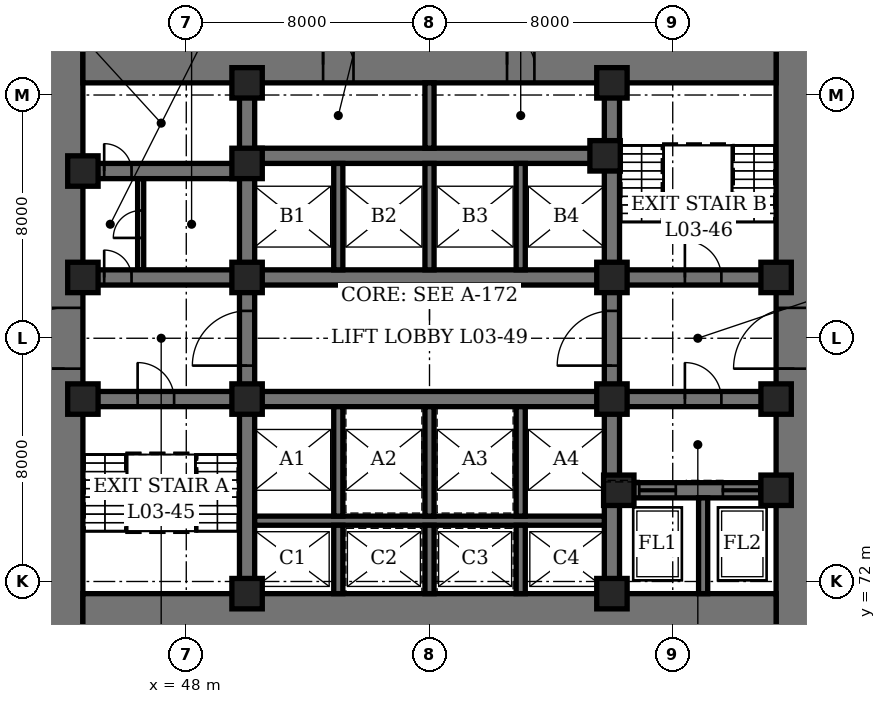
"""IFC4 building model, lengths in metres.
Left out: names, types, materials, properties, quantities, classifications, styles, units other than length and angle.
Written with IfcOpenShell. Run it as: python <this file> out.ifc"""

import sys

from ifc_helpers import new_model, si_unit, direction, frame, frame_2d, origin, origin_2d, place, context, subcontext, project, spatial, rectangle, hollow_rectangle, extrude, element, fill, save


model = new_model("IFC4")
c1 = context("Model", 3, precision=1e-05, world=origin(), true_north=direction((0.0, 1.0)))
c2 = subcontext(c1, "Body", "Model", "MODEL_VIEW")
j1 = project(units=[si_unit("LENGTHUNIT", "METRE"), si_unit("PLANEANGLEUNIT", "RADIAN")], contexts=[c1])
p1 = place(None, origin())
s1 = spatial("IfcSite", under=j1, at=p1, CompositionType="ELEMENT")
p2 = place(p1, origin())
s2 = spatial("IfcBuilding", under=s1, at=p2, CompositionType="ELEMENT")
p3 = place(p2, frame((0.0, 0.0, 14.9)))
s3 = spatial("IfcBuildingStorey", under=s2, at=p3, CompositionType="ELEMENT", Elevation=14.9)
p4 = place(p3, frame((44.0, 70.4, 0.0), z_axis=(0.0, 0.0, 1.0), x_axis=(0.0, 1.0, 0.0)))
e1 = element("IfcWall", 1, at=p4, inside=s3, PredefinedType="SHEAR", context=c2, shape_type="SweptSolid", body=[
    extrude(rectangle(XDim=19.2, YDim=1.2, at=frame_2d((9.6, 0.0))), origin(), (0.0, 0.0, 1.0), 5.0),
])
p5 = place(p4, frame((8.6, 0.0, 0.0)))
e2 = element("IfcOpeningElement", 2, at=p5, cuts=e1, PredefinedType="OPENING", context=c2, shape_type="SweptSolid", body=[
    extrude(rectangle(XDim=2.0, YDim=2.4, at=frame_2d((1.0, 1.2))), frame((0.0, 0.61, 0.0), z_axis=(0.0, -1.0, 0.0), x_axis=(1.0, 0.0, 0.0)), (0.0, 0.0, 1.0), 1.22),
])
p6 = place(p3, frame((68.0, 70.4, 0.0), z_axis=(0.0, 0.0, 1.0), x_axis=(0.0, 1.0, 0.0)))
e3 = element("IfcWall", 3, at=p6, inside=s3, PredefinedType="SHEAR", context=c2, shape_type="SweptSolid", body=[
    extrude(rectangle(XDim=19.2, YDim=1.2, at=frame_2d((9.6, 0.0))), origin(), (0.0, 0.0, 1.0), 5.0),
])
p7 = place(p6, frame((8.6, 0.0, 0.0)))
e4 = element("IfcOpeningElement", 4, at=p7, cuts=e3, PredefinedType="OPENING", context=c2, shape_type="SweptSolid", body=[
    extrude(rectangle(XDim=2.0, YDim=2.4, at=frame_2d((1.0, 1.2))), frame((0.0, 0.61, 0.0), z_axis=(0.0, -1.0, 0.0), x_axis=(1.0, 0.0, 0.0)), (0.0, 0.0, 1.0), 1.22),
])
p8 = place(p3, frame((44.6, 71.0, 0.0), z_axis=(0.0, 0.0, 1.0), x_axis=(1.0, 0.0, 0.0)))
e5 = element("IfcWall", 5, at=p8, inside=s3, PredefinedType="SHEAR", context=c2, shape_type="SweptSolid", body=[
    extrude(rectangle(XDim=22.8, YDim=1.2, at=frame_2d((11.4, 0.0))), origin(), (0.0, 0.0, 1.0), 5.0),
])
p9 = place(p3, frame((44.6, 89.0, 0.0), z_axis=(0.0, 0.0, 1.0), x_axis=(1.0, 0.0, 0.0)))
e6 = element("IfcWall", 6, at=p9, inside=s3, PredefinedType="SHEAR", context=c2, shape_type="SweptSolid", body=[
    extrude(rectangle(XDim=22.8, YDim=1.2, at=frame_2d((11.4, 0.0))), origin(), (0.0, 0.0, 1.0), 5.0),
])
p10 = place(p9, frame((7.9, 0.0, 0.0)))
e7 = element("IfcOpeningElement", 7, at=p10, cuts=e6, PredefinedType="OPENING", context=c2, shape_type="SweptSolid", body=[
    extrude(rectangle(XDim=1.0, YDim=2.1, at=frame_2d((0.5, 1.05))), frame((0.0, 0.61, 0.0), z_axis=(0.0, -1.0, 0.0), x_axis=(1.0, 0.0, 0.0)), (0.0, 0.0, 1.0), 1.22),
])
p11 = place(p9, frame((13.95, 0.0, 0.0)))
e8 = element("IfcOpeningElement", 8, at=p11, cuts=e6, PredefinedType="OPENING", context=c2, shape_type="SweptSolid", body=[
    extrude(rectangle(XDim=0.9, YDim=2.1, at=frame_2d((0.45, 1.05))), frame((0.0, 0.61, 0.0), z_axis=(0.0, -1.0, 0.0), x_axis=(1.0, 0.0, 0.0)), (0.0, 0.0, 1.0), 1.22),
])
p12 = place(p3, frame((50.0, 71.6, 0.0), z_axis=(0.0, 0.0, 1.0), x_axis=(0.0, 1.0, 0.0)))
e9 = element("IfcWall", 9, at=p12, inside=s3, PredefinedType="SHEAR", context=c2, shape_type="SweptSolid", body=[
    extrude(rectangle(XDim=16.8, YDim=0.5, at=frame_2d((8.4, 0.0))), origin(), (0.0, 0.0, 1.0), 5.0),
])
p13 = place(p12, frame((7.5, 0.0, 0.0)))
e10 = element("IfcOpeningElement", 10, at=p13, cuts=e9, PredefinedType="OPENING", context=c2, shape_type="SweptSolid", body=[
    extrude(rectangle(XDim=1.8, YDim=2.4, at=frame_2d((0.9, 1.2))), frame((0.0, 0.26, 0.0), z_axis=(0.0, -1.0, 0.0), x_axis=(1.0, 0.0, 0.0)), (0.0, 0.0, 1.0), 0.52),
])
p14 = place(p3, frame((62.0, 71.6, 0.0), z_axis=(0.0, 0.0, 1.0), x_axis=(0.0, 1.0, 0.0)))
e11 = element("IfcWall", 11, at=p14, inside=s3, PredefinedType="SHEAR", context=c2, shape_type="SweptSolid", body=[
    extrude(rectangle(XDim=16.8, YDim=0.5, at=frame_2d((8.4, 0.0))), origin(), (0.0, 0.0, 1.0), 5.0),
])
p15 = place(p14, frame((7.5, 0.0, 0.0)))
e12 = element("IfcOpeningElement", 12, at=p15, cuts=e11, PredefinedType="OPENING", context=c2, shape_type="SweptSolid", body=[
    extrude(rectangle(XDim=1.8, YDim=2.4, at=frame_2d((0.9, 1.2))), frame((0.0, 0.26, 0.0), z_axis=(0.0, -1.0, 0.0), x_axis=(1.0, 0.0, 0.0)), (0.0, 0.0, 1.0), 0.52),
])
p16 = place(p3, frame((44.6, 78.0, 0.0), z_axis=(0.0, 0.0, 1.0), x_axis=(1.0, 0.0, 0.0)))
e13 = element("IfcWall", 13, at=p16, inside=s3, PredefinedType="SHEAR", context=c2, shape_type="SweptSolid", body=[
    extrude(rectangle(XDim=5.15, YDim=0.5, at=frame_2d((2.575, 0.0))), origin(), (0.0, 0.0, 1.0), 5.0),
])
p17 = place(p16, frame((1.8, 0.0, 0.0)))
e14 = element("IfcOpeningElement", 14, at=p17, cuts=e13, PredefinedType="OPENING", context=c2, shape_type="SweptSolid", body=[
    extrude(rectangle(XDim=1.2, YDim=2.1, at=frame_2d((0.6, 1.05))), frame((0.0, 0.26, 0.0), z_axis=(0.0, -1.0, 0.0), x_axis=(1.0, 0.0, 0.0)), (0.0, 0.0, 1.0), 0.52),
])
p18 = place(p3, frame((44.6, 82.0, 0.0), z_axis=(0.0, 0.0, 1.0), x_axis=(1.0, 0.0, 0.0)))
e15 = element("IfcWall", 15, at=p18, inside=s3, PredefinedType="SHEAR", context=c2, shape_type="SweptSolid", body=[
    extrude(rectangle(XDim=5.15, YDim=0.5, at=frame_2d((2.575, 0.0))), origin(), (0.0, 0.0, 1.0), 5.0),
])
p19 = place(p18, frame((0.7, 0.0, 0.0)))
e16 = element("IfcOpeningElement", 16, at=p19, cuts=e15, PredefinedType="OPENING", context=c2, shape_type="SweptSolid", body=[
    extrude(rectangle(XDim=0.9, YDim=2.1, at=frame_2d((0.45, 1.05))), frame((0.0, 0.26, 0.0), z_axis=(0.0, -1.0, 0.0), x_axis=(1.0, 0.0, 0.0)), (0.0, 0.0, 1.0), 0.52),
])
p20 = place(p3, frame((44.6, 85.5, 0.0), z_axis=(0.0, 0.0, 1.0), x_axis=(1.0, 0.0, 0.0)))
e17 = element("IfcWall", 17, at=p20, inside=s3, PredefinedType="SHEAR", context=c2, shape_type="SweptSolid", body=[
    extrude(rectangle(XDim=5.15, YDim=0.5, at=frame_2d((2.575, 0.0))), origin(), (0.0, 0.0, 1.0), 5.0),
])
p21 = place(p20, frame((0.7, 0.0, 0.0)))
e18 = element("IfcOpeningElement", 18, at=p21, cuts=e17, PredefinedType="OPENING", context=c2, shape_type="SweptSolid", body=[
    extrude(rectangle(XDim=0.9, YDim=2.1, at=frame_2d((0.45, 1.05))), frame((0.0, 0.26, 0.0), z_axis=(0.0, -1.0, 0.0), x_axis=(1.0, 0.0, 0.0)), (0.0, 0.0, 1.0), 0.52),
])
p22 = place(p3, frame((62.25, 75.0, 0.0), z_axis=(0.0, 0.0, 1.0), x_axis=(1.0, 0.0, 0.0)))
e19 = element("IfcWall", 19, at=p22, inside=s3, PredefinedType="SHEAR", context=c2, shape_type="SweptSolid", body=[
    extrude(rectangle(XDim=5.15, YDim=0.5, at=frame_2d((2.575, 0.0))), origin(), (0.0, 0.0, 1.0), 5.0),
])
p23 = place(p22, frame((0.65, 0.0, 0.0)))
e20 = element("IfcOpeningElement", 20, at=p23, cuts=e19, PredefinedType="OPENING", context=c2, shape_type="SweptSolid", body=[
    extrude(rectangle(XDim=1.2, YDim=2.2, at=frame_2d((0.6, 1.1))), frame((0.0, 0.26, 0.0), z_axis=(0.0, -1.0, 0.0), x_axis=(1.0, 0.0, 0.0)), (0.0, 0.0, 1.0), 0.52),
])
p24 = place(p22, frame((3.4, 0.0, 0.0)))
e21 = element("IfcOpeningElement", 21, at=p24, cuts=e19, PredefinedType="OPENING", context=c2, shape_type="SweptSolid", body=[
    extrude(rectangle(XDim=1.2, YDim=2.2, at=frame_2d((0.6, 1.1))), frame((0.0, 0.26, 0.0), z_axis=(0.0, -1.0, 0.0), x_axis=(1.0, 0.0, 0.0)), (0.0, 0.0, 1.0), 0.52),
])
p25 = place(p3, frame((62.25, 78.0, 0.0), z_axis=(0.0, 0.0, 1.0), x_axis=(1.0, 0.0, 0.0)))
e22 = element("IfcWall", 22, at=p25, inside=s3, PredefinedType="SHEAR", context=c2, shape_type="SweptSolid", body=[
    extrude(rectangle(XDim=5.15, YDim=0.5, at=frame_2d((2.575, 0.0))), origin(), (0.0, 0.0, 1.0), 5.0),
])
p26 = place(p25, frame((2.15, 0.0, 0.0)))
e23 = element("IfcOpeningElement", 23, at=p26, cuts=e22, PredefinedType="OPENING", context=c2, shape_type="SweptSolid", body=[
    extrude(rectangle(XDim=1.2, YDim=2.1, at=frame_2d((0.6, 1.05))), frame((0.0, 0.26, 0.0), z_axis=(0.0, -1.0, 0.0), x_axis=(1.0, 0.0, 0.0)), (0.0, 0.0, 1.0), 0.52),
])
p27 = place(p3, frame((62.25, 82.0, 0.0), z_axis=(0.0, 0.0, 1.0), x_axis=(1.0, 0.0, 0.0)))
e24 = element("IfcWall", 24, at=p27, inside=s3, PredefinedType="SHEAR", context=c2, shape_type="SweptSolid", body=[
    extrude(rectangle(XDim=5.15, YDim=0.5, at=frame_2d((2.575, 0.0))), origin(), (0.0, 0.0, 1.0), 5.0),
])
p28 = place(p27, frame((2.15, 0.0, 0.0)))
e25 = element("IfcOpeningElement", 25, at=p28, cuts=e24, PredefinedType="OPENING", context=c2, shape_type="SweptSolid", body=[
    extrude(rectangle(XDim=1.2, YDim=2.1, at=frame_2d((0.6, 1.05))), frame((0.0, 0.26, 0.0), z_axis=(0.0, -1.0, 0.0), x_axis=(1.0, 0.0, 0.0)), (0.0, 0.0, 1.0), 0.52),
])
for number, where, z_axis, x_axis in (
    (26, (50.25, 78.0, 0.0), (0.0, 0.0, 1.0), (1.0, 0.0, 0.0)),
    (27, (50.25, 82.0, 0.0), (0.0, 0.0, 1.0), (1.0, 0.0, 0.0)),
    (28, (50.25, 86.0, 0.0), (0.0, 0.0, 1.0), (1.0, 0.0, 0.0)),
):
    element("IfcWall", number, at=place(p3, frame(where, z_axis=z_axis, x_axis=x_axis)), inside=s3, PredefinedType="SHEAR", context=c2, shape_type="SweptSolid", body=[
        extrude(rectangle(XDim=11.5, YDim=0.5, at=frame_2d((5.75, 0.0))), origin(), (0.0, 0.0, 1.0), 5.0),
    ])
p29 = place(p3, frame((50.25, 74.0, 0.0), z_axis=(0.0, 0.0, 1.0), x_axis=(1.0, 0.0, 0.0)))
e29 = element("IfcWall", 29, at=p29, inside=s3, PredefinedType="SHEAR", context=c2, shape_type="SweptSolid", body=[
    extrude(rectangle(XDim=11.5, YDim=0.3, at=frame_2d((5.75, 0.0))), origin(), (0.0, 0.0, 1.0), 5.0),
])
p30 = place(p3, frame((53.0, 71.6, 0.0), z_axis=(0.0, 0.0, 1.0), x_axis=(0.0, 1.0, 0.0)))
e30 = element("IfcWall", 30, at=p30, inside=s3, PredefinedType="SHEAR", context=c2, shape_type="SweptSolid", body=[
    extrude(rectangle(XDim=2.25, YDim=0.3, at=frame_2d((1.125, 0.0))), origin(), (0.0, 0.0, 1.0), 5.0),
])
p31 = place(p3, frame((53.0, 74.15, 0.0), z_axis=(0.0, 0.0, 1.0), x_axis=(0.0, 1.0, 0.0)))
e31 = element("IfcWall", 31, at=p31, inside=s3, PredefinedType="SHEAR", context=c2, shape_type="SweptSolid", body=[
    extrude(rectangle(XDim=3.6, YDim=0.3, at=frame_2d((1.8, 0.0))), origin(), (0.0, 0.0, 1.0), 5.0),
])
p32 = place(p3, frame((53.0, 82.25, 0.0), z_axis=(0.0, 0.0, 1.0), x_axis=(0.0, 1.0, 0.0)))
e32 = element("IfcWall", 32, at=p32, inside=s3, PredefinedType="SHEAR", context=c2, shape_type="SweptSolid", body=[
    extrude(rectangle(XDim=3.5, YDim=0.3, at=frame_2d((1.75, 0.0))), origin(), (0.0, 0.0, 1.0), 5.0),
])
p33 = place(p3, frame((56.0, 71.6, 0.0), z_axis=(0.0, 0.0, 1.0), x_axis=(0.0, 1.0, 0.0)))
e33 = element("IfcWall", 33, at=p33, inside=s3, PredefinedType="SHEAR", context=c2, shape_type="SweptSolid", body=[
    extrude(rectangle(XDim=2.25, YDim=0.3, at=frame_2d((1.125, 0.0))), origin(), (0.0, 0.0, 1.0), 5.0),
])
p34 = place(p3, frame((56.0, 74.15, 0.0), z_axis=(0.0, 0.0, 1.0), x_axis=(0.0, 1.0, 0.0)))
e34 = element("IfcWall", 34, at=p34, inside=s3, PredefinedType="SHEAR", context=c2, shape_type="SweptSolid", body=[
    extrude(rectangle(XDim=3.6, YDim=0.3, at=frame_2d((1.8, 0.0))), origin(), (0.0, 0.0, 1.0), 5.0),
])
p35 = place(p3, frame((56.0, 82.25, 0.0), z_axis=(0.0, 0.0, 1.0), x_axis=(0.0, 1.0, 0.0)))
e35 = element("IfcWall", 35, at=p35, inside=s3, PredefinedType="SHEAR", context=c2, shape_type="SweptSolid", body=[
    extrude(rectangle(XDim=3.5, YDim=0.3, at=frame_2d((1.75, 0.0))), origin(), (0.0, 0.0, 1.0), 5.0),
])
p36 = place(p3, frame((59.0, 71.6, 0.0), z_axis=(0.0, 0.0, 1.0), x_axis=(0.0, 1.0, 0.0)))
e36 = element("IfcWall", 36, at=p36, inside=s3, PredefinedType="SHEAR", context=c2, shape_type="SweptSolid", body=[
    extrude(rectangle(XDim=2.25, YDim=0.3, at=frame_2d((1.125, 0.0))), origin(), (0.0, 0.0, 1.0), 5.0),
])
p37 = place(p3, frame((59.0, 74.15, 0.0), z_axis=(0.0, 0.0, 1.0), x_axis=(0.0, 1.0, 0.0)))
e37 = element("IfcWall", 37, at=p37, inside=s3, PredefinedType="SHEAR", context=c2, shape_type="SweptSolid", body=[
    extrude(rectangle(XDim=3.6, YDim=0.3, at=frame_2d((1.8, 0.0))), origin(), (0.0, 0.0, 1.0), 5.0),
])
p38 = place(p3, frame((59.0, 82.25, 0.0), z_axis=(0.0, 0.0, 1.0), x_axis=(0.0, 1.0, 0.0)))
e38 = element("IfcWall", 38, at=p38, inside=s3, PredefinedType="SHEAR", context=c2, shape_type="SweptSolid", body=[
    extrude(rectangle(XDim=3.5, YDim=0.3, at=frame_2d((1.75, 0.0))), origin(), (0.0, 0.0, 1.0), 5.0),
])
p39 = place(p3, frame((65.0, 71.6, 0.0), z_axis=(0.0, 0.0, 1.0), x_axis=(0.0, 1.0, 0.0)))
e39 = element("IfcWall", 39, at=p39, inside=s3, PredefinedType="SHEAR", context=c2, shape_type="SweptSolid", body=[
    extrude(rectangle(XDim=3.15, YDim=0.3, at=frame_2d((1.575, 0.0))), origin(), (0.0, 0.0, 1.0), 5.0),
])
p40 = place(p3, frame((56.0, 86.25, 0.0), z_axis=(0.0, 0.0, 1.0), x_axis=(0.0, 1.0, 0.0)))
e40 = element("IfcWall", 40, at=p40, inside=s3, PredefinedType="SHEAR", context=c2, shape_type="SweptSolid", body=[
    extrude(rectangle(XDim=2.15, YDim=0.3, at=frame_2d((1.075, 0.0))), origin(), (0.0, 0.0, 1.0), 5.0),
])
for number, where, z_axis, x_axis in (
    (41, (44.6, 78.0, 0.0), (0.0, 0.0, 1.0), (1.0, 0.0, 0.0)),
    (42, (44.6, 82.0, 0.0), (0.0, 0.0, 1.0), (1.0, 0.0, 0.0)),
    (43, (44.6, 85.5, 0.0), (0.0, 0.0, 1.0), (1.0, 0.0, 0.0)),
    (44, (50.0, 71.6, 0.0), (0.0, 0.0, 1.0), (1.0, 0.0, 0.0)),
    (45, (50.0, 78.0, 0.0), (0.0, 0.0, 1.0), (1.0, 0.0, 0.0)),
    (46, (50.0, 82.0, 0.0), (0.0, 0.0, 1.0), (1.0, 0.0, 0.0)),
    (47, (50.0, 85.75, 0.0), (0.0, 0.0, 1.0), (1.0, 0.0, 0.0)),
    (48, (50.0, 88.4, 0.0), (0.0, 0.0, 1.0), (1.0, 0.0, 0.0)),
    (49, (61.775, 86.0, 0.0), (0.0, 0.0, 1.0), (1.0, 0.0, 0.0)),
    (50, (62.0, 71.6, 0.0), (0.0, 0.0, 1.0), (1.0, 0.0, 0.0)),
    (51, (62.0, 78.0, 0.0), (0.0, 0.0, 1.0), (1.0, 0.0, 0.0)),
    (52, (62.0, 82.0, 0.0), (0.0, 0.0, 1.0), (1.0, 0.0, 0.0)),
    (53, (62.0, 88.4, 0.0), (0.0, 0.0, 1.0), (1.0, 0.0, 0.0)),
    (54, (62.225, 75.0, 0.0), (0.0, 0.0, 1.0), (1.0, 0.0, 0.0)),
    (55, (67.4, 75.0, 0.0), (0.0, 0.0, 1.0), (1.0, 0.0, 0.0)),
    (56, (67.4, 78.0, 0.0), (0.0, 0.0, 1.0), (1.0, 0.0, 0.0)),
    (57, (67.4, 82.0, 0.0), (0.0, 0.0, 1.0), (1.0, 0.0, 0.0)),
):
    element("IfcColumn", number, at=place(p3, frame(where, z_axis=z_axis, x_axis=x_axis)), inside=s3, PredefinedType="COLUMN", context=c2, shape_type="SweptSolid", body=[
        extrude(hollow_rectangle(XDim=1.0, YDim=1.0, WallThickness=0.15, at=origin_2d()), origin(), (0.0, 0.0, 1.0), 5.0),
    ])
p41 = place(p3, frame((46.5, 82.25, 0.0), z_axis=(0.0, 0.0, 1.0), x_axis=(0.0, 1.0, 0.0)))
e58 = element("IfcWall", 58, at=p41, inside=s3, PredefinedType="PARTITIONING", context=c2, shape_type="SweptSolid", body=[
    extrude(rectangle(XDim=3.0, YDim=0.2, at=frame_2d((1.5, 0.0))), origin(), (0.0, 0.0, 1.0), 4.8),
])
p42 = place(p41, frame((1.05, 0.0, 0.0)))
e59 = element("IfcOpeningElement", 59, at=p42, cuts=e58, PredefinedType="OPENING", context=c2, shape_type="SweptSolid", body=[
    extrude(rectangle(XDim=0.9, YDim=2.1, at=frame_2d((0.45, 1.05))), frame((0.0, 0.11, 0.0), z_axis=(0.0, -1.0, 0.0), x_axis=(1.0, 0.0, 0.0)), (0.0, 0.0, 1.0), 0.22),
])
p43 = place(p19, origin())
e60 = element("IfcDoor", 60, at=p43, inside=s3, OperationType="SINGLE_SWING_LEFT", PredefinedType="DOOR", context=c2, shape_type="SweptSolid", body=[
    extrude(rectangle(XDim=0.9, YDim=2.1, at=frame_2d((0.45, 1.05))), frame((0.0, 0.25, 0.0), z_axis=(0.0, -1.0, 0.0), x_axis=(1.0, 0.0, 0.0)), (0.0, 0.0, 1.0), 0.5),
])
fill(e16, e60)
p44 = place(p42, origin())
e61 = element("IfcDoor", 61, at=p44, inside=s3, OperationType="SINGLE_SWING_RIGHT", PredefinedType="DOOR", context=c2, shape_type="SweptSolid", body=[
    extrude(rectangle(XDim=0.9, YDim=2.1, at=frame_2d((0.45, 1.05))), frame((0.0, 0.1, 0.0), z_axis=(0.0, -1.0, 0.0), x_axis=(1.0, 0.0, 0.0)), (0.0, 0.0, 1.0), 0.199),
])
fill(e59, e61)
p45 = place(p21, origin())
e62 = element("IfcDoor", 62, at=p45, inside=s3, OperationType="SINGLE_SWING_RIGHT", PredefinedType="DOOR", context=c2, shape_type="SweptSolid", body=[
    extrude(rectangle(XDim=0.9, YDim=2.1, at=frame_2d((0.45, 1.05))), frame((0.0, 0.25, 0.0), z_axis=(0.0, -1.0, 0.0), x_axis=(1.0, 0.0, 0.0)), (0.0, 0.0, 1.0), 0.5),
])
fill(e18, e62)
p46 = place(p10, origin())
e63 = element("IfcDoor", 63, at=p46, inside=s3, OperationType="SINGLE_SWING_LEFT", PredefinedType="DOOR", context=c2, shape_type="SweptSolid", body=[
    extrude(rectangle(XDim=1.0, YDim=2.1, at=frame_2d((0.5, 1.05))), frame((0.0, 0.35, 0.0), z_axis=(0.0, -1.0, 0.0), x_axis=(1.0, 0.0, 0.0)), (0.0, 0.0, 1.0), 0.7),
])
fill(e7, e63)
p47 = place(p11, origin())
e64 = element("IfcDoor", 64, at=p47, inside=s3, OperationType="SINGLE_SWING_LEFT", PredefinedType="DOOR", context=c2, shape_type="SweptSolid", body=[
    extrude(rectangle(XDim=0.9, YDim=2.1, at=frame_2d((0.45, 1.05))), frame((0.0, 0.35, 0.0), z_axis=(0.0, -1.0, 0.0), x_axis=(1.0, 0.0, 0.0)), (0.0, 0.0, 1.0), 0.7),
])
fill(e8, e64)
p48 = place(p17, origin())
e65 = element("IfcDoor", 65, at=p48, inside=s3, OperationType="SINGLE_SWING_LEFT", PredefinedType="DOOR", context=c2, shape_type="SweptSolid", body=[
    extrude(rectangle(XDim=1.2, YDim=2.1, at=frame_2d((0.6, 1.05))), frame((0.0, 0.25, 0.0), z_axis=(0.0, -1.0, 0.0), x_axis=(1.0, 0.0, 0.0)), (0.0, 0.0, 1.0), 0.5),
])
fill(e14, e65)
p49 = place(p28, origin())
e66 = element("IfcDoor", 66, at=p49, inside=s3, OperationType="SINGLE_SWING_LEFT", PredefinedType="DOOR", context=c2, shape_type="SweptSolid", body=[
    extrude(rectangle(XDim=1.2, YDim=2.1, at=frame_2d((0.6, 1.05))), frame((0.0, 0.25, 0.0), z_axis=(0.0, -1.0, 0.0), x_axis=(1.0, 0.0, 0.0)), (0.0, 0.0, 1.0), 0.5),
])
fill(e25, e66)
p50 = place(p5, origin())
e67 = element("IfcDoor", 67, at=p50, inside=s3, OperationType="DOUBLE_DOOR_SINGLE_SWING", PredefinedType="DOOR", context=c2, shape_type="SweptSolid", body=[
    extrude(rectangle(XDim=2.0, YDim=2.4, at=frame_2d((1.0, 1.2))), frame((0.0, 0.35, 0.0), z_axis=(0.0, -1.0, 0.0), x_axis=(1.0, 0.0, 0.0)), (0.0, 0.0, 1.0), 0.7),
])
fill(e2, e67)
p51 = place(p7, origin())
e68 = element("IfcDoor", 68, at=p51, inside=s3, OperationType="DOUBLE_DOOR_SINGLE_SWING", PredefinedType="DOOR", context=c2, shape_type="SweptSolid", body=[
    extrude(rectangle(XDim=2.0, YDim=2.4, at=frame_2d((1.0, 1.2))), frame((0.0, 0.35, 0.0), z_axis=(0.0, -1.0, 0.0), x_axis=(1.0, 0.0, 0.0)), (0.0, 0.0, 1.0), 0.7),
])
fill(e4, e68)
p52 = place(p13, origin())
e69 = element("IfcDoor", 69, at=p52, inside=s3, OperationType="DOUBLE_DOOR_SINGLE_SWING", PredefinedType="DOOR", context=c2, shape_type="SweptSolid", body=[
    extrude(rectangle(XDim=1.8, YDim=2.4, at=frame_2d((0.9, 1.2))), frame((0.0, 0.25, 0.0), z_axis=(0.0, -1.0, 0.0), x_axis=(1.0, 0.0, 0.0)), (0.0, 0.0, 1.0), 0.5),
])
fill(e10, e69)
p53 = place(p15, origin())
e70 = element("IfcDoor", 70, at=p53, inside=s3, OperationType="DOUBLE_DOOR_SINGLE_SWING", PredefinedType="DOOR", context=c2, shape_type="SweptSolid", body=[
    extrude(rectangle(XDim=1.8, YDim=2.4, at=frame_2d((0.9, 1.2))), frame((0.0, 0.25, 0.0), z_axis=(0.0, -1.0, 0.0), x_axis=(1.0, 0.0, 0.0)), (0.0, 0.0, 1.0), 0.5),
])
fill(e12, e70)
p54 = place(p26, origin())
e71 = element("IfcDoor", 71, at=p54, inside=s3, OperationType="SINGLE_SWING_RIGHT", PredefinedType="DOOR", context=c2, shape_type="SweptSolid", body=[
    extrude(rectangle(XDim=1.2, YDim=2.1, at=frame_2d((0.6, 1.05))), frame((0.0, 0.25, 0.0), z_axis=(0.0, -1.0, 0.0), x_axis=(1.0, 0.0, 0.0)), (0.0, 0.0, 1.0), 0.5),
])
fill(e23, e71)
p55 = place(p23, origin())
e72 = element("IfcDoor", 72, at=p55, inside=s3, OperationType="SLIDING_TO_LEFT", PredefinedType="DOOR", context=c2, shape_type="SweptSolid", body=[
    extrude(rectangle(XDim=1.2, YDim=2.2, at=frame_2d((0.6, 1.1))), frame((0.0, 0.25, 0.0), z_axis=(0.0, -1.0, 0.0), x_axis=(1.0, 0.0, 0.0)), (0.0, 0.0, 1.0), 0.5),
])
fill(e20, e72)
p56 = place(p24, origin())
e73 = element("IfcDoor", 73, at=p56, inside=s3, OperationType="SLIDING_TO_LEFT", PredefinedType="DOOR", context=c2, shape_type="SweptSolid", body=[
    extrude(rectangle(XDim=1.2, YDim=2.2, at=frame_2d((0.6, 1.1))), frame((0.0, 0.25, 0.0), z_axis=(0.0, -1.0, 0.0), x_axis=(1.0, 0.0, 0.0)), (0.0, 0.0, 1.0), 0.5),
])
fill(e21, e73)
save(model, sys.argv[1])
